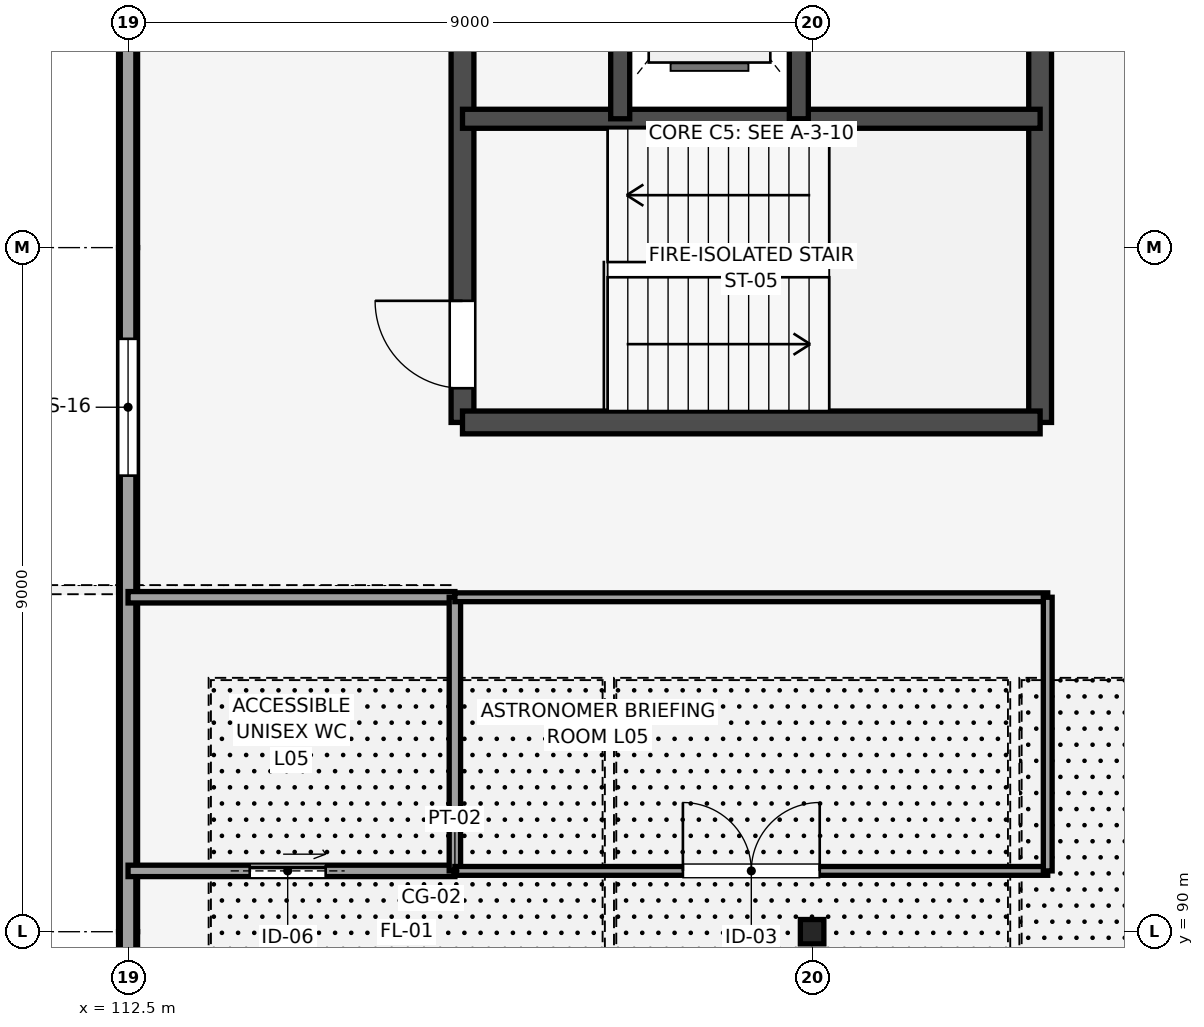
"""IFC4 building model, lengths in metres.
Left out: names, types, materials, properties, quantities, classifications, styles, units other than length and angle.
Written with IfcOpenShell. Run it as: python <this file> out.ifc"""

import sys

from ifc_helpers import new_model, si_unit, direction, frame, frame_2d, origin, origin_2d, place, context, subcontext, project, spatial, rectangle, i_section, extrude, element, fill, save


model = new_model("IFC4")
c1 = context("Model", 3, precision=1e-05, world=origin(), true_north=direction((0.0, 1.0)))
c2 = subcontext(c1, "Body", "Model", "MODEL_VIEW")
j1 = project(units=[si_unit("LENGTHUNIT", "METRE"), si_unit("PLANEANGLEUNIT", "RADIAN")], contexts=[c1])
p1 = place(None, origin())
s1 = spatial("IfcSite", under=j1, at=p1, CompositionType="ELEMENT")
p2 = place(p1, origin())
s2 = spatial("IfcBuilding", under=s1, at=p2, CompositionType="ELEMENT")
p3 = place(p2, frame((0.0, 0.0, 23.4)))
s3 = spatial("IfcBuildingStorey", under=s2, at=p3, CompositionType="ELEMENT", Elevation=23.4)
p4 = place(p3, frame((121.5, 90.0, 0.0), z_axis=(0.0, 0.0, 1.0), x_axis=(1.0, 0.0, 0.0)))
e1 = element("IfcColumn", 1, at=p4, inside=s3, PredefinedType="COLUMN", context=c2, shape_type="SweptSolid", body=[
    extrude(i_section(OverallWidth=0.309, OverallDepth=0.321, WebThickness=0.014, FlangeThickness=0.022, FilletRadius=0.017, at=origin_2d()), origin(), (0.0, 0.0, 1.0), 2.55),
])
p5 = place(p3, frame((116.9, 96.7, 0.0), z_axis=(0.0, 0.0, 1.0), x_axis=(0.0, 1.0, 0.0)))
e2 = element("IfcWall", 2, at=p5, inside=s3, PredefinedType="SHEAR", context=c2, shape_type="SweptSolid", body=[
    extrude(rectangle(XDim=7.6, YDim=0.3, at=frame_2d((3.8, 0.0))), origin(), (0.0, 0.0, 1.0), 2.39),
])
p6 = place(p5, frame((0.45, 0.0, 0.0)))
e3 = element("IfcOpeningElement", 3, at=p6, cuts=e2, PredefinedType="OPENING", context=c2, shape_type="SweptSolid", body=[
    extrude(rectangle(XDim=1.15, YDim=2.15, at=frame_2d((0.575, 1.075))), frame((0.0, 0.16, 0.0), z_axis=(0.0, -1.0, 0.0), x_axis=(1.0, 0.0, 0.0)), (0.0, 0.0, 1.0), 0.32),
])
for number, where, z_axis, x_axis in (
    (4, (124.5, 96.7, 0.0), (0.0, 0.0, 1.0), (0.0, 1.0, 0.0)),
    (5, (116.9, 96.7, 0.0), (0.0, 0.0, 1.0), (1.0, 0.0, 0.0)),
):
    element("IfcWall", number, at=place(p3, frame(where, z_axis=z_axis, x_axis=x_axis)), inside=s3, PredefinedType="SHEAR", context=c2, shape_type="SweptSolid", body=[
        extrude(rectangle(XDim=7.6, YDim=0.3, at=frame_2d((3.8, 0.0))), origin(), (0.0, 0.0, 1.0), 2.39),
    ])
p7 = place(p3, frame((116.9, 100.695, 0.0), z_axis=(0.0, 0.0, 1.0), x_axis=(1.0, 0.0, 0.0)))
e6 = element("IfcWall", 6, at=p7, inside=s3, PredefinedType="SHEAR", context=c2, shape_type="SweptSolid", body=[
    extrude(rectangle(XDim=7.6, YDim=0.25, at=frame_2d((3.8, 0.0))), origin(), (0.0, 0.0, 1.0), 2.39),
])
for number, where, z_axis, x_axis in (
    (7, (118.975, 100.695, 0.0), (0.0, 0.0, 1.0), (0.0, 1.0, 0.0)),
    (8, (121.325, 100.695, 0.0), (0.0, 0.0, 1.0), (0.0, 1.0, 0.0)),
):
    element("IfcWall", number, at=place(p3, frame(where, z_axis=z_axis, x_axis=x_axis)), inside=s3, PredefinedType="SHEAR", context=c2, shape_type="SweptSolid", body=[
        extrude(rectangle(XDim=3.605, YDim=0.25, at=frame_2d((1.802, 0.0))), origin(), (0.0, 0.0, 1.0), 2.39),
    ])
p8 = place(p3, frame((112.5, 90.0, 0.0), z_axis=(0.0, 0.0, 1.0), x_axis=(0.0, -1.0, 0.0)))
e9 = element("IfcWall", 9, at=p8, inside=s3, PredefinedType="STANDARD", context=c2, shape_type="SweptSolid", body=[
    extrude(rectangle(XDim=9.0, YDim=0.25, at=frame_2d((4.5, 0.0))), origin(), (0.0, 0.0, 1.0), 2.39),
])
p9 = place(p8, frame((5.2, 0.0, 0.3)))
e10 = element("IfcOpeningElement", 10, at=p9, cuts=e9, PredefinedType="OPENING", context=c2, shape_type="SweptSolid", body=[
    extrude(rectangle(XDim=1.7, YDim=1.3, at=frame_2d((0.85, 0.65))), frame((0.0, 0.135, 0.0), z_axis=(0.0, -1.0, 0.0), x_axis=(1.0, 0.0, 0.0)), (0.0, 0.0, 1.0), 0.27),
])
p10 = place(p3, frame((112.5, 99.0, 0.0), z_axis=(0.0, 0.0, 1.0), x_axis=(0.0, -1.0, 0.0)))
e11 = element("IfcWall", 11, at=p10, inside=s3, PredefinedType="STANDARD", context=c2, shape_type="SweptSolid", body=[
    extrude(rectangle(XDim=9.0, YDim=0.25, at=frame_2d((4.5, 0.0))), origin(), (0.0, 0.0, 1.0), 2.39),
])
p11 = place(p10, frame((1.2, 0.0, 0.3)))
e12 = element("IfcOpeningElement", 12, at=p11, cuts=e11, PredefinedType="OPENING", context=c2, shape_type="SweptSolid", body=[
    extrude(rectangle(XDim=1.8, YDim=1.3, at=frame_2d((0.9, 0.65))), frame((0.0, 0.135, 0.0), z_axis=(0.0, -1.0, 0.0), x_axis=(1.0, 0.0, 0.0)), (0.0, 0.0, 1.0), 0.27),
])
p12 = place(p3, frame((112.5, 108.0, 0.0), z_axis=(0.0, 0.0, 1.0), x_axis=(0.0, -1.0, 0.0)))
e13 = element("IfcWall", 13, at=p12, inside=s3, PredefinedType="STANDARD", context=c2, shape_type="SweptSolid", body=[
    extrude(rectangle(XDim=9.0, YDim=0.25, at=frame_2d((4.5, 0.0))), origin(), (0.0, 0.0, 1.0), 2.39),
])
p13 = place(p12, frame((3.4, 0.0, 0.3)))
e14 = element("IfcOpeningElement", 14, at=p13, cuts=e13, PredefinedType="OPENING", context=c2, shape_type="SweptSolid", body=[
    extrude(rectangle(XDim=1.9, YDim=1.3, at=frame_2d((0.95, 0.65))), frame((0.0, 0.135, 0.0), z_axis=(0.0, -1.0, 0.0), x_axis=(1.0, 0.0, 0.0)), (0.0, 0.0, 1.0), 0.27),
])
p14 = place(p3, frame((112.5, 72.0, 2.55), z_axis=(0.0, 0.0, 1.0), x_axis=(0.0, 1.0, 0.0)))
e15 = element("IfcWall", 15, at=p14, inside=s3, PredefinedType="PARAPET", context=c2, shape_type="SweptSolid", body=[
    extrude(rectangle(XDim=36.0, YDim=0.205, at=frame_2d((18.0, 0.0))), origin(), (0.0, 0.0, 1.0), 0.4),
])
p15 = place(p3, frame((112.5, 90.8, 0.0), z_axis=(0.0, 0.0, 1.0), x_axis=(1.0, 0.0, 0.0)))
e16 = element("IfcWall", 16, at=p15, inside=s3, PredefinedType="PARTITIONING", context=c2, shape_type="SweptSolid", body=[
    extrude(rectangle(XDim=4.3, YDim=0.15, at=frame_2d((2.15, 0.0))), origin(), (0.0, 0.0, 1.0), 2.24),
])
p16 = place(p15, frame((1.6, 0.0, 0.0)))
e17 = element("IfcOpeningElement", 17, at=p16, cuts=e16, PredefinedType="OPENING", context=c2, shape_type="SweptSolid", body=[
    extrude(rectangle(XDim=1.0, YDim=2.15, at=frame_2d((0.5, 1.075))), frame((0.0, 0.085, 0.0), z_axis=(0.0, -1.0, 0.0), x_axis=(1.0, 0.0, 0.0)), (0.0, 0.0, 1.0), 0.17),
])
p17 = place(p3, frame((112.5, 94.4, 0.0), z_axis=(0.0, 0.0, 1.0), x_axis=(1.0, 0.0, 0.0)))
e18 = element("IfcWall", 18, at=p17, inside=s3, PredefinedType="PARTITIONING", context=c2, shape_type="SweptSolid", body=[
    extrude(rectangle(XDim=4.3, YDim=0.15, at=frame_2d((2.15, 0.0))), origin(), (0.0, 0.0, 1.0), 2.24),
])
p18 = place(p3, frame((116.8, 90.8, 0.0), z_axis=(0.0, 0.0, 1.0), x_axis=(0.0, 1.0, 0.0)))
e19 = element("IfcWall", 19, at=p18, inside=s3, PredefinedType="PARTITIONING", context=c2, shape_type="SweptSolid", body=[
    extrude(rectangle(XDim=3.6, YDim=0.15, at=frame_2d((1.8, 0.0))), origin(), (0.0, 0.0, 1.0), 2.24),
])
p19 = place(p3, frame((116.8, 90.8, 0.0), z_axis=(0.0, 0.0, 1.0), x_axis=(1.0, 0.0, 0.0)))
e20 = element("IfcWall", 20, at=p19, inside=s3, PredefinedType="PARTITIONING", context=c2, shape_type="SweptSolid", body=[
    extrude(rectangle(XDim=7.8, YDim=0.116, at=frame_2d((3.9, 0.0))), origin(), (0.0, 0.0, 1.0), 2.24),
])
p20 = place(p19, frame((3.0, 0.0, 0.0)))
e21 = element("IfcOpeningElement", 21, at=p20, cuts=e20, PredefinedType="OPENING", context=c2, shape_type="SweptSolid", body=[
    extrude(rectangle(XDim=1.8, YDim=2.3, at=frame_2d((0.9, 1.15))), frame((0.0, 0.068, 0.0), z_axis=(0.0, -1.0, 0.0), x_axis=(1.0, 0.0, 0.0)), (0.0, 0.0, 1.0), 0.136),
])
p21 = place(p3, frame((116.8, 94.4, 0.0), z_axis=(0.0, 0.0, 1.0), x_axis=(1.0, 0.0, 0.0)))
e22 = element("IfcWall", 22, at=p21, inside=s3, PredefinedType="PARTITIONING", context=c2, shape_type="SweptSolid", body=[
    extrude(rectangle(XDim=7.8, YDim=0.116, at=frame_2d((3.9, 0.0))), origin(), (0.0, 0.0, 1.0), 2.24),
])
p22 = place(p3, frame((124.6, 90.8, 0.0), z_axis=(0.0, 0.0, 1.0), x_axis=(0.0, 1.0, 0.0)))
e23 = element("IfcWall", 23, at=p22, inside=s3, PredefinedType="PARTITIONING", context=c2, shape_type="SweptSolid", body=[
    extrude(rectangle(XDim=3.6, YDim=0.116, at=frame_2d((1.8, 0.0))), origin(), (0.0, 0.0, 1.0), 2.24),
])
p23 = place(p11, origin())
e24 = element("IfcWindow", 24, at=p23, inside=s3, PartitioningType="SINGLE_PANEL", PredefinedType="WINDOW", context=c2, shape_type="SweptSolid", body=[
    extrude(rectangle(XDim=1.8, YDim=1.3, at=frame_2d((0.9, 0.65))), frame((0.0, 0.03, 0.0), z_axis=(0.0, -1.0, 0.0), x_axis=(1.0, 0.0, 0.0)), (0.0, 0.0, 1.0), 0.06),
])
fill(e12, e24)
p24 = place(p6, origin())
e25 = element("IfcDoor", 25, at=p24, inside=s3, OperationType="SINGLE_SWING_RIGHT", PredefinedType="DOOR", context=c2, shape_type="SweptSolid", body=[
    extrude(rectangle(XDim=1.15, YDim=2.15, at=frame_2d((0.575, 1.075))), frame((0.0, 0.025, 0.0), z_axis=(0.0, -1.0, 0.0), x_axis=(1.0, 0.0, 0.0)), (0.0, 0.0, 1.0), 0.05),
])
fill(e3, e25)
p25 = place(p16, origin())
e26 = element("IfcDoor", 26, at=p25, inside=s3, OperationType="SLIDING_TO_LEFT", PredefinedType="DOOR", context=c2, shape_type="SweptSolid", body=[
    extrude(rectangle(XDim=1.0, YDim=2.15, at=frame_2d((0.5, 1.075))), frame((0.0, 0.025, 0.0), z_axis=(0.0, -1.0, 0.0), x_axis=(1.0, 0.0, 0.0)), (0.0, 0.0, 1.0), 0.05),
])
fill(e17, e26)
p26 = place(p20, origin())
e27 = element("IfcDoor", 27, at=p26, inside=s3, OperationType="DOUBLE_DOOR_SINGLE_SWING", PredefinedType="DOOR", context=c2, shape_type="SweptSolid", body=[
    extrude(rectangle(XDim=1.8, YDim=2.3, at=frame_2d((0.9, 1.15))), frame((0.0, 0.025, 0.0), z_axis=(0.0, -1.0, 0.0), x_axis=(1.0, 0.0, 0.0)), (0.0, 0.0, 1.0), 0.05),
])
fill(e21, e27)
save(model, sys.argv[1])
